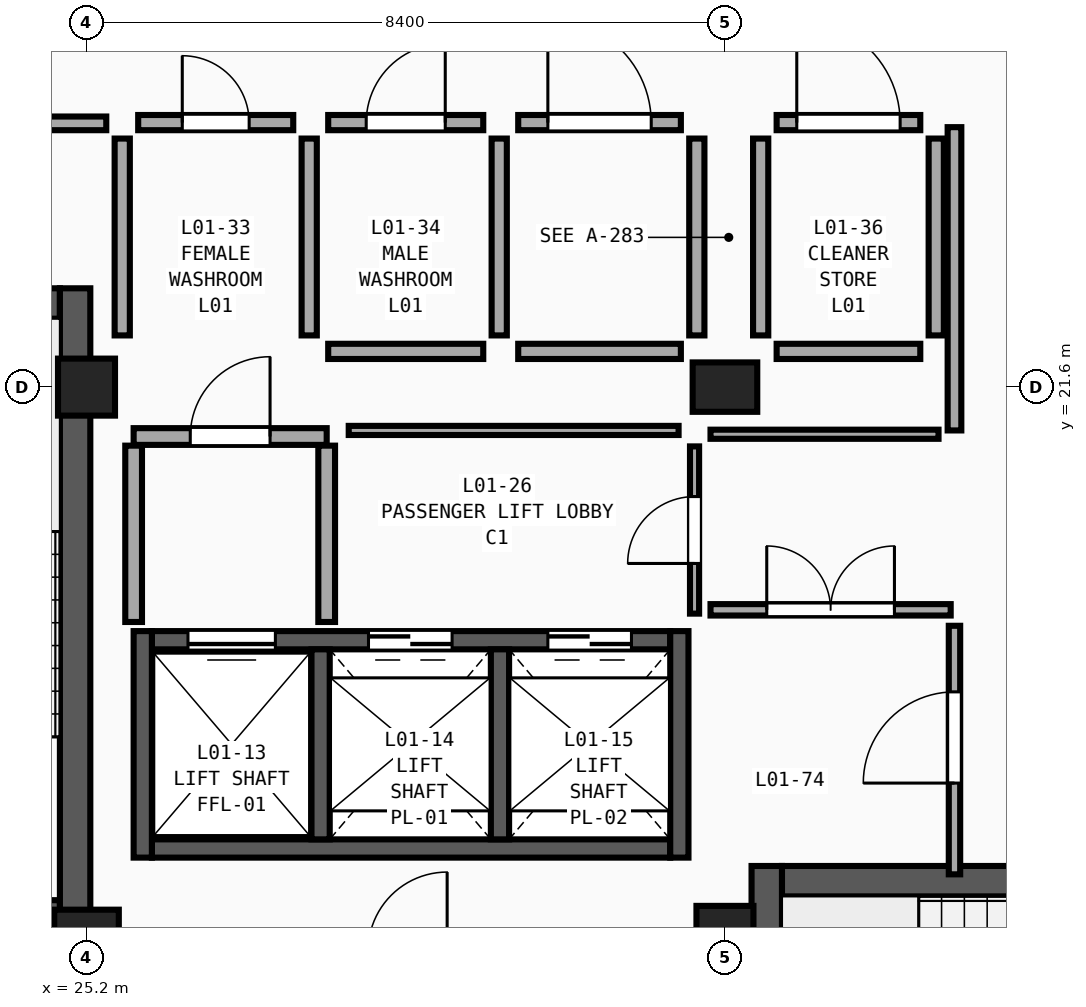
"""IFC4 building model, lengths in metres.
Left out: names, types, materials, properties, quantities, classifications, styles, units other than length and angle.
Written with IfcOpenShell. Run it as: python <this file> out.ifc"""

import sys

from ifc_helpers import new_model, si_unit, direction, frame, frame_2d, origin, origin_2d, place, context, subcontext, project, spatial, rectangle, extrude, element, fill, save


model = new_model("IFC4")
c1 = context("Model", 3, precision=1e-05, world=origin(), true_north=direction((0.0, 1.0)))
c2 = subcontext(c1, "Body", "Model", "MODEL_VIEW")
j1 = project(units=[si_unit("LENGTHUNIT", "METRE"), si_unit("PLANEANGLEUNIT", "RADIAN")], contexts=[c1])
p1 = place(None, origin())
s1 = spatial("IfcSite", under=j1, at=p1, CompositionType="ELEMENT")
p2 = place(p1, origin())
s2 = spatial("IfcBuilding", under=s1, at=p2, CompositionType="ELEMENT")
p3 = place(p2, frame((0.0, 0.0, 5.4)))
s3 = spatial("IfcBuildingStorey", under=s2, at=p3, CompositionType="ELEMENT", Elevation=5.4)
p4 = place(p3, frame((25.2, 14.4, 0.0), z_axis=(0.0, 0.0, 1.0), x_axis=(1.0, 0.0, 0.0)))
e1 = element("IfcColumn", 1, at=p4, inside=s3, PredefinedType="COLUMN", context=c2, shape_type="SweptSolid", body=[
    extrude(rectangle(XDim=0.85, YDim=0.65, at=origin_2d()), origin(), (0.0, 0.0, 1.0), 4.5),
])
for number, where, z_axis, x_axis in (
    (2, (25.2, 21.6, 0.0), (0.0, 0.0, 1.0), (1.0, 0.0, 0.0)),
    (3, (33.6, 14.4, 0.0), (0.0, 0.0, 1.0), (1.0, 0.0, 0.0)),
):
    element("IfcColumn", number, at=place(p3, frame(where, z_axis=z_axis, x_axis=x_axis)), inside=s3, PredefinedType="COLUMN", context=c2, shape_type="SweptSolid", body=[
        extrude(rectangle(XDim=0.75, YDim=0.75, at=origin_2d()), origin(), (0.0, 0.0, 1.0), 4.5),
    ])
p5 = place(p3, frame((33.6, 21.6, 0.0), z_axis=(0.0, 0.0, 1.0), x_axis=(1.0, 0.0, 0.0)))
e4 = element("IfcColumn", 4, at=p5, inside=s3, PredefinedType="COLUMN", context=c2, shape_type="SweptSolid", body=[
    extrude(rectangle(XDim=0.85, YDim=0.65, at=origin_2d()), origin(), (0.0, 0.0, 1.0), 4.5),
])
p6 = place(p3, frame((24.85, 14.65, 0.0), z_axis=(0.0, 0.0, 1.0), x_axis=(-1.0, 0.0, 0.0)))
e5 = element("IfcWall", 5, at=p6, inside=s3, PredefinedType="SHEAR", context=c2, shape_type="SweptSolid", body=[
    extrude(rectangle(XDim=7.7, YDim=0.4, at=frame_2d((3.85, 0.0))), origin(), (0.0, 0.0, 1.0), 4.5),
])
p7 = place(p6, frame((3.3, 0.0, 0.0)))
e6 = element("IfcOpeningElement", 6, at=p7, cuts=e5, PredefinedType="OPENING", context=c2, shape_type="SweptSolid", body=[
    extrude(rectangle(XDim=1.1, YDim=2.2, at=frame_2d((0.55, 1.1))), frame((0.0, 0.22, 0.0), z_axis=(0.0, -1.0, 0.0), x_axis=(1.0, 0.0, 0.0)), (0.0, 0.0, 1.0), 0.44),
])
p8 = place(p3, frame((17.15, 22.7, 0.0), z_axis=(0.0, 0.0, 1.0), x_axis=(1.0, 0.0, 0.0)))
e7 = element("IfcWall", 7, at=p8, inside=s3, PredefinedType="SHEAR", context=c2, shape_type="SweptSolid", body=[
    extrude(rectangle(XDim=7.7, YDim=0.4, at=frame_2d((3.85, 0.0))), origin(), (0.0, 0.0, 1.0), 4.5),
])
p9 = place(p3, frame((25.05, 14.45, 0.0), z_axis=(0.0, 0.0, 1.0), x_axis=(0.0, 1.0, 0.0)))
e8 = element("IfcWall", 8, at=p9, inside=s3, PredefinedType="SHEAR", context=c2, shape_type="SweptSolid", body=[
    extrude(rectangle(XDim=8.45, YDim=0.4, at=frame_2d((4.225, 0.0))), origin(), (0.0, 0.0, 1.0), 4.5),
])
p10 = place(p3, frame((34.35, 15.1, 0.0), z_axis=(0.0, 0.0, 1.0), x_axis=(1.0, 0.0, 0.0)))
e9 = element("IfcWall", 9, at=p10, inside=s3, PredefinedType="SHEAR", context=c2, shape_type="SweptSolid", body=[
    extrude(rectangle(XDim=6.9, YDim=0.4, at=frame_2d((3.45, 0.0))), origin(), (0.0, 0.0, 1.0), 4.5),
])
p11 = place(p3, frame((34.15, 15.3, 0.0), z_axis=(0.0, 0.0, 1.0), x_axis=(0.0, -1.0, 0.0)))
e10 = element("IfcWall", 10, at=p11, inside=s3, PredefinedType="SHEAR", context=c2, shape_type="SweptSolid", body=[
    extrude(rectangle(XDim=8.05, YDim=0.4, at=frame_2d((4.025, 0.0))), origin(), (0.0, 0.0, 1.0), 4.5),
])
p12 = place(p3, frame((32.88, 18.27, 0.0), z_axis=(0.0, 0.0, 1.0), x_axis=(-1.0, 0.0, 0.0)))
e11 = element("IfcWall", 11, at=p12, inside=s3, PredefinedType="SHEAR", context=c2, shape_type="SweptSolid", body=[
    extrude(rectangle(XDim=6.82, YDim=0.24, at=frame_2d((3.41, 0.0))), origin(), (0.0, 0.0, 1.0), 4.18),
])
p13 = place(p12, frame((5.195, 0.0, 0.0)))
e12 = element("IfcOpeningElement", 12, at=p13, cuts=e11, PredefinedType="OPENING", context=c2, shape_type="SweptSolid", body=[
    extrude(rectangle(XDim=1.15, YDim=2.25, at=frame_2d((0.575, 1.125))), frame((0.0, 0.14, 0.0), z_axis=(0.0, -1.0, 0.0), x_axis=(1.0, 0.0, 0.0)), (0.0, 0.0, 1.0), 0.28),
])
p14 = place(p12, frame((2.87, 0.0, 0.0)))
e13 = element("IfcOpeningElement", 13, at=p14, cuts=e11, PredefinedType="OPENING", context=c2, shape_type="SweptSolid", body=[
    extrude(rectangle(XDim=1.1, YDim=2.2, at=frame_2d((0.55, 1.1))), frame((0.0, 0.14, 0.0), z_axis=(0.0, -1.0, 0.0), x_axis=(1.0, 0.0, 0.0)), (0.0, 0.0, 1.0), 0.28),
])
p15 = place(p12, frame((0.51, 0.0, 0.0)))
e14 = element("IfcOpeningElement", 14, at=p15, cuts=e11, PredefinedType="OPENING", context=c2, shape_type="SweptSolid", body=[
    extrude(rectangle(XDim=1.1, YDim=2.2, at=frame_2d((0.55, 1.1))), frame((0.0, 0.14, 0.0), z_axis=(0.0, -1.0, 0.0), x_axis=(1.0, 0.0, 0.0)), (0.0, 0.0, 1.0), 0.28),
])
p16 = place(p3, frame((26.06, 15.53, 0.0), z_axis=(0.0, 0.0, 1.0), x_axis=(1.0, 0.0, 0.0)))
e15 = element("IfcWall", 15, at=p16, inside=s3, PredefinedType="SHEAR", context=c2, shape_type="SweptSolid", body=[
    extrude(rectangle(XDim=6.82, YDim=0.24, at=frame_2d((3.41, 0.0))), origin(), (0.0, 0.0, 1.0), 4.18),
])
for number, where, z_axis, x_axis in (
    (16, (25.94, 18.39, 0.0), (0.0, 0.0, 1.0), (0.0, -1.0, 0.0)),
    (17, (33.0, 15.41, 0.0), (0.0, 0.0, 1.0), (0.0, 1.0, 0.0)),
):
    element("IfcWall", number, at=place(p3, frame(where, z_axis=z_axis, x_axis=x_axis)), inside=s3, PredefinedType="SHEAR", context=c2, shape_type="SweptSolid", body=[
        extrude(rectangle(XDim=2.98, YDim=0.24, at=frame_2d((1.49, 0.0))), origin(), (0.0, 0.0, 1.0), 4.18),
    ])
for number, where, z_axis, x_axis in (
    (18, (28.28, 15.65, 0.0), (0.0, 0.0, 1.0), (0.0, 1.0, 0.0)),
    (19, (30.64, 15.65, 0.0), (0.0, 0.0, 1.0), (0.0, 1.0, 0.0)),
):
    element("IfcWall", number, at=place(p3, frame(where, z_axis=z_axis, x_axis=x_axis)), inside=s3, PredefinedType="SHEAR", context=c2, shape_type="SweptSolid", body=[
        extrude(rectangle(XDim=2.5, YDim=0.24, at=frame_2d((1.25, 0.0))), origin(), (0.0, 0.0, 1.0), 4.18),
    ])
p17 = place(p3, frame((25.82, 20.95, 0.0), z_axis=(0.0, 0.0, 1.0), x_axis=(1.0, 0.0, 0.0)))
e20 = element("IfcWall", 20, at=p17, inside=s3, PredefinedType="SOLIDWALL", context=c2, shape_type="SweptSolid", body=[
    extrude(rectangle(XDim=2.54, YDim=0.22, at=frame_2d((1.27, 0.0))), origin(), (0.0, 0.0, 1.0), 3.73),
])
p18 = place(p17, frame((0.745, 0.0, 0.0)))
e21 = element("IfcOpeningElement", 21, at=p18, cuts=e20, PredefinedType="OPENING", context=c2, shape_type="SweptSolid", body=[
    extrude(rectangle(XDim=1.05, YDim=2.15, at=frame_2d((0.525, 1.075))), frame((0.0, 0.13, 0.0), z_axis=(0.0, -1.0, 0.0), x_axis=(1.0, 0.0, 0.0)), (0.0, 0.0, 1.0), 0.26),
])
for number, where, z_axis, x_axis in (
    (22, (25.82, 18.51, 0.0), (0.0, 0.0, 1.0), (0.0, 1.0, 0.0)),
    (23, (28.36, 18.51, 0.0), (0.0, 0.0, 1.0), (0.0, 1.0, 0.0)),
):
    element("IfcWall", number, at=place(p3, frame(where, z_axis=z_axis, x_axis=x_axis)), inside=s3, PredefinedType="SOLIDWALL", context=c2, shape_type="SweptSolid", body=[
        extrude(rectangle(XDim=2.32, YDim=0.22, at=frame_2d((1.16, 0.0))), origin(), (0.0, 0.0, 1.0), 4.18),
    ])
p19 = place(p3, frame((28.65, 21.03, 0.0), z_axis=(0.0, 0.0, 1.0), x_axis=(1.0, 0.0, 0.0)))
e24 = element("IfcWall", 24, at=p19, inside=s3, PredefinedType="PARTITIONING", context=c2, shape_type="SweptSolid", body=[
    extrude(rectangle(XDim=4.34, YDim=0.12, at=frame_2d((2.17, 0.0))), origin(), (0.0, 0.0, 1.0), 3.73),
])
p20 = place(p3, frame((36.62, 21.03, 0.0), z_axis=(0.0, 0.0, 1.0), x_axis=(0.0, 1.0, 0.0)))
e25 = element("IfcWall", 25, at=p20, inside=s3, PredefinedType="PARTITIONING", context=c2, shape_type="SweptSolid", body=[
    extrude(rectangle(XDim=3.99, YDim=0.18, at=frame_2d((1.995, 0.0))), origin(), (0.0, 0.0, 1.0), 4.18),
])
p21 = place(p3, frame((36.62, 15.19, 0.0), z_axis=(0.0, 0.0, 1.0), x_axis=(0.0, 1.0, 0.0)))
e26 = element("IfcWall", 26, at=p21, inside=s3, PredefinedType="PARTITIONING", context=c2, shape_type="SweptSolid", body=[
    extrude(rectangle(XDim=3.27, YDim=0.15, at=frame_2d((1.635, 0.0))), origin(), (0.0, 0.0, 1.0), 4.18),
])
p22 = place(p21, frame((1.201, 0.0, 0.0)))
e27 = element("IfcOpeningElement", 27, at=p22, cuts=e26, PredefinedType="OPENING", context=c2, shape_type="SweptSolid", body=[
    extrude(rectangle(XDim=1.2, YDim=2.29, at=frame_2d((0.6, 1.145))), frame((0.0, 0.095, 0.0), z_axis=(0.0, -1.0, 0.0), x_axis=(1.0, 0.0, 0.0)), (0.0, 0.0, 1.0), 0.19),
])
p23 = place(p3, frame((22.24, 25.07, 0.0), z_axis=(0.0, 0.0, 1.0), x_axis=(1.0, 0.0, 0.0)))
e28 = element("IfcWall", 28, at=p23, inside=s3, PredefinedType="PARTITIONING", context=c2, shape_type="SweptSolid", body=[
    extrude(rectangle(XDim=3.22, YDim=0.18, at=frame_2d((1.61, 0.0))), origin(), (0.0, 0.0, 1.0), 4.18),
])
p24 = place(p23, frame((0.85, 0.0, 0.0)))
e29 = element("IfcOpeningElement", 29, at=p24, cuts=e28, PredefinedType="OPENING", context=c2, shape_type="SweptSolid", body=[
    extrude(rectangle(XDim=1.52, YDim=2.29, at=frame_2d((0.76, 1.145))), frame((0.0, 0.11, 0.0), z_axis=(0.0, -1.0, 0.0), x_axis=(1.0, 0.0, 0.0)), (0.0, 0.0, 1.0), 0.22),
])
p25 = place(p3, frame((33.41, 18.67, 0.0), z_axis=(0.0, 0.0, 1.0), x_axis=(1.0, 0.0, 0.0)))
e30 = element("IfcWall", 30, at=p25, inside=s3, PredefinedType="PARTITIONING", context=c2, shape_type="SweptSolid", body=[
    extrude(rectangle(XDim=3.16, YDim=0.15, at=frame_2d((1.58, 0.0))), origin(), (0.0, 0.0, 1.0), 4.18),
])
p26 = place(p25, frame((0.74, 0.0, 0.0)))
e31 = element("IfcOpeningElement", 31, at=p26, cuts=e30, PredefinedType="OPENING", context=c2, shape_type="SweptSolid", body=[
    extrude(rectangle(XDim=1.68, YDim=2.29, at=frame_2d((0.84, 1.145))), frame((0.0, 0.095, 0.0), z_axis=(0.0, -1.0, 0.0), x_axis=(1.0, 0.0, 0.0)), (0.0, 0.0, 1.0), 0.19),
])
p27 = place(p3, frame((33.41, 20.98, 0.0), z_axis=(0.0, 0.0, 1.0), x_axis=(1.0, 0.0, 0.0)))
e32 = element("IfcWall", 32, at=p27, inside=s3, PredefinedType="PARTITIONING", context=c2, shape_type="SweptSolid", body=[
    extrude(rectangle(XDim=3.0, YDim=0.12, at=frame_2d((1.5, 0.0))), origin(), (0.0, 0.0, 1.0), 3.73),
])
p28 = place(p3, frame((33.2, 18.62, 0.0), z_axis=(0.0, 0.0, 1.0), x_axis=(0.0, 1.0, 0.0)))
e33 = element("IfcWall", 33, at=p28, inside=s3, PredefinedType="PARTITIONING", context=c2, shape_type="SweptSolid", body=[
    extrude(rectangle(XDim=2.2, YDim=0.12, at=frame_2d((1.1, 0.0))), origin(), (0.0, 0.0, 1.0), 3.73),
])
p29 = place(p28, frame((0.66, 0.0, 0.0)))
e34 = element("IfcOpeningElement", 34, at=p29, cuts=e33, PredefinedType="OPENING", context=c2, shape_type="SweptSolid", body=[
    extrude(rectangle(XDim=0.88, YDim=2.13, at=frame_2d((0.44, 1.065))), frame((0.0, 0.08, 0.0), z_axis=(0.0, -1.0, 0.0), x_axis=(1.0, 0.0, 0.0)), (0.0, 0.0, 1.0), 0.16),
])
p30 = place(p3, frame((30.88, 25.08, 0.0), z_axis=(0.0, 0.0, 1.0), x_axis=(1.0, 0.0, 0.0)))
e35 = element("IfcWall", 35, at=p30, inside=s3, PredefinedType="PLUMBINGWALL", context=c2, shape_type="SweptSolid", body=[
    extrude(rectangle(XDim=2.14, YDim=0.2, at=frame_2d((1.07, 0.0))), origin(), (0.0, 0.0, 1.0), 4.18),
])
p31 = place(p30, frame((0.39, 0.0, 0.0)))
e36 = element("IfcOpeningElement", 36, at=p31, cuts=e35, PredefinedType="OPENING", context=c2, shape_type="SweptSolid", body=[
    extrude(rectangle(XDim=1.36, YDim=2.13, at=frame_2d((0.68, 1.065))), frame((0.0, 0.12, 0.0), z_axis=(0.0, -1.0, 0.0), x_axis=(1.0, 0.0, 0.0)), (0.0, 0.0, 1.0), 0.24),
])
p32 = place(p3, frame((25.88, 25.08, 0.0), z_axis=(0.0, 0.0, 1.0), x_axis=(1.0, 0.0, 0.0)))
e37 = element("IfcWall", 37, at=p32, inside=s3, PredefinedType="PLUMBINGWALL", context=c2, shape_type="SweptSolid", body=[
    extrude(rectangle(XDim=2.04, YDim=0.2, at=frame_2d((1.02, 0.0))), origin(), (0.0, 0.0, 1.0), 4.18),
])
p33 = place(p32, frame((0.58, 0.0, 0.0)))
e38 = element("IfcOpeningElement", 38, at=p33, cuts=e37, PredefinedType="OPENING", context=c2, shape_type="SweptSolid", body=[
    extrude(rectangle(XDim=0.88, YDim=2.21, at=frame_2d((0.44, 1.105))), frame((0.0, 0.12, 0.0), z_axis=(0.0, -1.0, 0.0), x_axis=(1.0, 0.0, 0.0)), (0.0, 0.0, 1.0), 0.24),
])
p34 = place(p3, frame((28.38, 25.08, 0.0), z_axis=(0.0, 0.0, 1.0), x_axis=(1.0, 0.0, 0.0)))
e39 = element("IfcWall", 39, at=p34, inside=s3, PredefinedType="PLUMBINGWALL", context=c2, shape_type="SweptSolid", body=[
    extrude(rectangle(XDim=2.04, YDim=0.2, at=frame_2d((1.02, 0.0))), origin(), (0.0, 0.0, 1.0), 4.18),
])
p35 = place(p34, frame((0.5, 0.0, 0.0)))
e40 = element("IfcOpeningElement", 40, at=p35, cuts=e39, PredefinedType="OPENING", context=c2, shape_type="SweptSolid", body=[
    extrude(rectangle(XDim=1.04, YDim=2.21, at=frame_2d((0.52, 1.105))), frame((0.0, 0.12, 0.0), z_axis=(0.0, -1.0, 0.0), x_axis=(1.0, 0.0, 0.0)), (0.0, 0.0, 1.0), 0.24),
])
p36 = place(p3, frame((34.28, 25.08, 0.0), z_axis=(0.0, 0.0, 1.0), x_axis=(1.0, 0.0, 0.0)))
e41 = element("IfcWall", 41, at=p36, inside=s3, PredefinedType="PLUMBINGWALL", context=c2, shape_type="SweptSolid", body=[
    extrude(rectangle(XDim=1.89, YDim=0.2, at=frame_2d((0.945, 0.0))), origin(), (0.0, 0.0, 1.0), 4.18),
])
p37 = place(p36, frame((0.265, 0.0, 0.0)))
e42 = element("IfcOpeningElement", 42, at=p37, cuts=e41, PredefinedType="OPENING", context=c2, shape_type="SweptSolid", body=[
    extrude(rectangle(XDim=1.36, YDim=2.29, at=frame_2d((0.68, 1.145))), frame((0.0, 0.12, 0.0), z_axis=(0.0, -1.0, 0.0), x_axis=(1.0, 0.0, 0.0)), (0.0, 0.0, 1.0), 0.24),
])
for number, where, z_axis, x_axis in (
    (43, (28.13, 22.28, 0.0), (0.0, 0.0, 1.0), (0.0, 1.0, 0.0)),
    (44, (25.67, 22.28, 0.0), (0.0, 0.0, 1.0), (0.0, 1.0, 0.0)),
    (45, (30.63, 22.28, 0.0), (0.0, 0.0, 1.0), (0.0, 1.0, 0.0)),
):
    element("IfcWall", number, at=place(p3, frame(where, z_axis=z_axis, x_axis=x_axis)), inside=s3, PredefinedType="PLUMBINGWALL", context=c2, shape_type="SweptSolid", body=[
        extrude(rectangle(XDim=2.59, YDim=0.2, at=frame_2d((1.295, 0.0))), origin(), (0.0, 0.0, 1.0), 4.18),
    ])
p38 = place(p3, frame((33.23, 22.28, 0.0), z_axis=(0.0, 0.0, 1.0), x_axis=(0.0, 1.0, 0.0)))
e46 = element("IfcWall", 46, at=p38, inside=s3, PredefinedType="PLUMBINGWALL", context=c2, shape_type="SweptSolid", body=[
    extrude(rectangle(XDim=2.59, YDim=0.2, at=frame_2d((1.295, 0.0))), origin(), (0.0, 0.0, 1.0), 3.73),
])
p39 = place(p3, frame((36.38, 22.28, 0.0), z_axis=(0.0, 0.0, 1.0), x_axis=(0.0, 1.0, 0.0)))
e47 = element("IfcWall", 47, at=p39, inside=s3, PredefinedType="PLUMBINGWALL", context=c2, shape_type="SweptSolid", body=[
    extrude(rectangle(XDim=2.59, YDim=0.2, at=frame_2d((1.295, 0.0))), origin(), (0.0, 0.0, 1.0), 4.18),
])
p40 = place(p3, frame((34.07, 22.28, 0.0), z_axis=(0.0, 0.0, 1.0), x_axis=(0.0, 1.0, 0.0)))
e48 = element("IfcWall", 48, at=p40, inside=s3, PredefinedType="PLUMBINGWALL", context=c2, shape_type="SweptSolid", body=[
    extrude(rectangle(XDim=2.59, YDim=0.2, at=frame_2d((1.295, 0.0))), origin(), (0.0, 0.0, 1.0), 3.73),
])
p41 = place(p3, frame((30.88, 22.07, 0.0), z_axis=(0.0, 0.0, 1.0), x_axis=(1.0, 0.0, 0.0)))
e49 = element("IfcWall", 49, at=p41, inside=s3, PredefinedType="PLUMBINGWALL", context=c2, shape_type="SweptSolid", body=[
    extrude(rectangle(XDim=2.14, YDim=0.2, at=frame_2d((1.07, 0.0))), origin(), (0.0, 0.0, 1.0), 3.73),
])
p42 = place(p3, frame((28.38, 22.07, 0.0), z_axis=(0.0, 0.0, 1.0), x_axis=(1.0, 0.0, 0.0)))
e50 = element("IfcWall", 50, at=p42, inside=s3, PredefinedType="PLUMBINGWALL", context=c2, shape_type="SweptSolid", body=[
    extrude(rectangle(XDim=2.04, YDim=0.2, at=frame_2d((1.02, 0.0))), origin(), (0.0, 0.0, 1.0), 3.73),
])
p43 = place(p3, frame((34.28, 22.07, 0.0), z_axis=(0.0, 0.0, 1.0), x_axis=(1.0, 0.0, 0.0)))
e51 = element("IfcWall", 51, at=p43, inside=s3, PredefinedType="PLUMBINGWALL", context=c2, shape_type="SweptSolid", body=[
    extrude(rectangle(XDim=1.89, YDim=0.2, at=frame_2d((0.945, 0.0))), origin(), (0.0, 0.0, 1.0), 3.73),
])
p44 = place(p13, origin())
e52 = element("IfcDoor", 52, at=p44, inside=s3, OperationType="SLIDING_TO_LEFT", PredefinedType="DOOR", context=c2, shape_type="SweptSolid", body=[
    extrude(rectangle(XDim=1.15, YDim=2.25, at=frame_2d((0.575, 1.125))), frame((0.0, 0.025, 0.0), z_axis=(0.0, -1.0, 0.0), x_axis=(1.0, 0.0, 0.0)), (0.0, 0.0, 1.0), 0.05),
])
fill(e12, e52)
p45 = place(p14, origin())
e53 = element("IfcDoor", 53, at=p45, inside=s3, OperationType="DOUBLE_DOOR_SLIDING", PredefinedType="DOOR", context=c2, shape_type="SweptSolid", body=[
    extrude(rectangle(XDim=1.1, YDim=2.2, at=frame_2d((0.55, 1.1))), frame((0.0, 0.025, 0.0), z_axis=(0.0, -1.0, 0.0), x_axis=(1.0, 0.0, 0.0)), (0.0, 0.0, 1.0), 0.05),
])
fill(e13, e53)
p46 = place(p15, origin())
e54 = element("IfcDoor", 54, at=p46, inside=s3, OperationType="DOUBLE_DOOR_SLIDING", PredefinedType="DOOR", context=c2, shape_type="SweptSolid", body=[
    extrude(rectangle(XDim=1.1, YDim=2.2, at=frame_2d((0.55, 1.1))), frame((0.0, 0.025, 0.0), z_axis=(0.0, -1.0, 0.0), x_axis=(1.0, 0.0, 0.0)), (0.0, 0.0, 1.0), 0.05),
])
fill(e14, e54)
p47 = place(p18, origin())
e55 = element("IfcDoor", 55, at=p47, inside=s3, OperationType="SINGLE_SWING_RIGHT", PredefinedType="DOOR", context=c2, shape_type="SweptSolid", body=[
    extrude(rectangle(XDim=1.05, YDim=2.15, at=frame_2d((0.525, 1.075))), frame((0.0, 0.025, 0.0), z_axis=(0.0, -1.0, 0.0), x_axis=(1.0, 0.0, 0.0)), (0.0, 0.0, 1.0), 0.05),
])
fill(e21, e55)
p48 = place(p22, origin())
e56 = element("IfcDoor", 56, at=p48, inside=s3, OperationType="SINGLE_SWING_LEFT", PredefinedType="DOOR", context=c2, shape_type="SweptSolid", body=[
    extrude(rectangle(XDim=1.2, YDim=2.29, at=frame_2d((0.6, 1.145))), frame((0.0, 0.025, 0.0), z_axis=(0.0, -1.0, 0.0), x_axis=(1.0, 0.0, 0.0)), (0.0, 0.0, 1.0), 0.05),
])
fill(e27, e56)
p49 = place(p26, origin())
e57 = element("IfcDoor", 57, at=p49, inside=s3, OperationType="DOUBLE_DOOR_SINGLE_SWING", PredefinedType="DOOR", context=c2, shape_type="SweptSolid", body=[
    extrude(rectangle(XDim=1.68, YDim=2.29, at=frame_2d((0.84, 1.145))), frame((0.0, 0.025, 0.0), z_axis=(0.0, -1.0, 0.0), x_axis=(1.0, 0.0, 0.0)), (0.0, 0.0, 1.0), 0.05),
])
fill(e31, e57)
p50 = place(p29, origin())
e58 = element("IfcDoor", 58, at=p50, inside=s3, OperationType="SINGLE_SWING_LEFT", PredefinedType="DOOR", context=c2, shape_type="SweptSolid", body=[
    extrude(rectangle(XDim=0.88, YDim=2.13, at=frame_2d((0.44, 1.065))), frame((0.0, 0.025, 0.0), z_axis=(0.0, -1.0, 0.0), x_axis=(1.0, 0.0, 0.0)), (0.0, 0.0, 1.0), 0.05),
])
fill(e34, e58)
p51 = place(p31, origin())
e59 = element("IfcDoor", 59, at=p51, inside=s3, OperationType="SINGLE_SWING_LEFT", PredefinedType="DOOR", context=c2, shape_type="SweptSolid", body=[
    extrude(rectangle(XDim=1.36, YDim=2.13, at=frame_2d((0.68, 1.065))), frame((0.0, 0.025, 0.0), z_axis=(0.0, -1.0, 0.0), x_axis=(1.0, 0.0, 0.0)), (0.0, 0.0, 1.0), 0.05),
])
fill(e36, e59)
p52 = place(p33, origin())
e60 = element("IfcDoor", 60, at=p52, inside=s3, OperationType="SINGLE_SWING_LEFT", PredefinedType="DOOR", context=c2, shape_type="SweptSolid", body=[
    extrude(rectangle(XDim=0.88, YDim=2.21, at=frame_2d((0.44, 1.105))), frame((0.0, 0.025, 0.0), z_axis=(0.0, -1.0, 0.0), x_axis=(1.0, 0.0, 0.0)), (0.0, 0.0, 1.0), 0.05),
])
fill(e38, e60)
p53 = place(p35, origin())
e61 = element("IfcDoor", 61, at=p53, inside=s3, OperationType="SINGLE_SWING_RIGHT", PredefinedType="DOOR", context=c2, shape_type="SweptSolid", body=[
    extrude(rectangle(XDim=1.04, YDim=2.21, at=frame_2d((0.52, 1.105))), frame((0.0, 0.025, 0.0), z_axis=(0.0, -1.0, 0.0), x_axis=(1.0, 0.0, 0.0)), (0.0, 0.0, 1.0), 0.05),
])
fill(e40, e61)
p54 = place(p37, origin())
e62 = element("IfcDoor", 62, at=p54, inside=s3, OperationType="SINGLE_SWING_LEFT", PredefinedType="DOOR", context=c2, shape_type="SweptSolid", body=[
    extrude(rectangle(XDim=1.36, YDim=2.29, at=frame_2d((0.68, 1.145))), frame((0.0, 0.025, 0.0), z_axis=(0.0, -1.0, 0.0), x_axis=(1.0, 0.0, 0.0)), (0.0, 0.0, 1.0), 0.05),
])
fill(e42, e62)
save(model, sys.argv[1])
